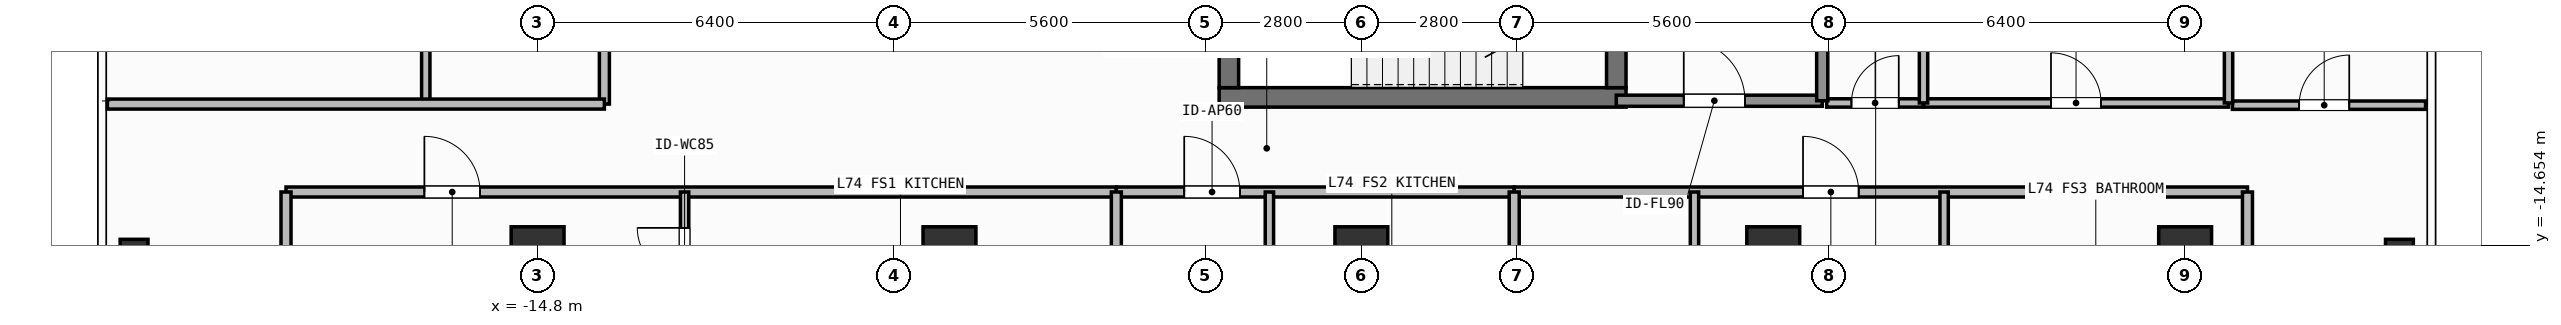
"""IFC4 building model, lengths in metres.
Left out: names, types, materials, properties, quantities, classifications, styles, units other than length and angle.
Written with IfcOpenShell. Run it as: python <this file> out.ifc"""

import sys

from ifc_helpers import new_model, si_unit, direction, frame, frame_2d, origin, origin_2d, place, context, subcontext, project, spatial, rectangle, hollow_rectangle, extrude, element, fill, save


model = new_model("IFC4")
c1 = context("Model", 3, precision=1e-05, world=origin(), true_north=direction((0.0, 1.0)))
c2 = subcontext(c1, "Body", "Model", "MODEL_VIEW")
j1 = project(units=[si_unit("LENGTHUNIT", "METRE"), si_unit("PLANEANGLEUNIT", "RADIAN")], contexts=[c1])
p1 = place(None, origin())
s1 = spatial("IfcSite", under=j1, at=p1, CompositionType="ELEMENT")
p2 = place(p1, origin())
s2 = spatial("IfcBuilding", under=s1, at=p2, CompositionType="ELEMENT")
p3 = place(p2, frame((0.0, 0.0, 301.5)))
s3 = spatial("IfcBuildingStorey", under=s2, at=p3, CompositionType="ELEMENT", Elevation=301.5)
p4 = place(p3, frame((-2.555, -12.0, 0.0), z_axis=(0.0, 0.0, 1.0), x_axis=(1.0, 0.0, 0.0)))
e1 = element("IfcWall", 1, at=p4, inside=s3, PredefinedType="SHEAR", context=c2, shape_type="SweptSolid", body=[
    extrude(rectangle(XDim=7.31, YDim=0.35, at=frame_2d((3.655, 0.0))), origin(), (0.0, 0.0, 1.0), 3.9),
])
p5 = place(p3, frame((-2.38, -11.825, 0.0), z_axis=(0.0, 0.0, 1.0), x_axis=(0.0, 1.0, 0.0)))
e2 = element("IfcWall", 2, at=p5, inside=s3, PredefinedType="SHEAR", context=c2, shape_type="SweptSolid", body=[
    extrude(rectangle(XDim=2.925, YDim=0.35, at=frame_2d((1.462, 0.0))), origin(), (0.0, 0.0, 1.0), 3.9),
])
p6 = place(p3, frame((4.58, -8.9, 0.0), z_axis=(0.0, 0.0, 1.0), x_axis=(0.0, -1.0, 0.0)))
e3 = element("IfcWall", 3, at=p6, inside=s3, PredefinedType="SHEAR", context=c2, shape_type="SweptSolid", body=[
    extrude(rectangle(XDim=2.925, YDim=0.35, at=frame_2d((1.462, 0.0))), origin(), (0.0, 0.0, 1.0), 3.9),
])
p7 = place(p6, frame((0.913, 0.0, 0.0)))
e4 = element("IfcOpeningElement", 4, at=p7, cuts=e3, PredefinedType="OPENING", context=c2, shape_type="SweptSolid", body=[
    extrude(rectangle(XDim=1.1, YDim=2.15, at=frame_2d((0.55, 1.075))), frame((0.0, 0.185, 0.0), z_axis=(0.0, -1.0, 0.0), x_axis=(1.0, 0.0, 0.0)), (0.0, 0.0, 1.0), 0.37),
])
for number, where, z_axis, x_axis in (
    (5, (-14.8, -14.8, 0.0), (0.0, 0.0, 1.0), (1.0, 0.0, 0.0)),
    (6, (-7.4, -14.8, 0.0), (0.0, 0.0, 1.0), (1.0, 0.0, 0.0)),
    (7, (0.0, -14.8, 0.0), (0.0, 0.0, 1.0), (1.0, 0.0, 0.0)),
    (8, (7.4, -14.8, 0.0), (0.0, 0.0, 1.0), (1.0, 0.0, 0.0)),
    (9, (14.8, -14.8, 0.0), (0.0, 0.0, 1.0), (1.0, 0.0, 0.0)),
):
    element("IfcColumn", number, at=place(p3, frame(where, z_axis=z_axis, x_axis=x_axis)), inside=s3, PredefinedType="COLUMN", context=c2, shape_type="SweptSolid", body=[
        extrude(rectangle(XDim=0.95, YDim=0.95, at=origin_2d()), origin(), (0.0, 0.0, 1.0), 3.9),
    ])
for number, where, z_axis, x_axis in (
    (10, (-22.05, -14.8, 0.0), (0.0, 0.0, 1.0), (1.0, 0.0, 0.0)),
    (11, (18.65, -14.8, 0.0), (0.0, 0.0, 1.0), (1.0, 0.0, 0.0)),
):
    element("IfcColumn", number, at=place(p3, frame(where, z_axis=z_axis, x_axis=x_axis)), inside=s3, PredefinedType="COLUMN", context=c2, shape_type="SweptSolid", body=[
        extrude(hollow_rectangle(XDim=0.5, YDim=0.5, WallThickness=0.025, at=origin_2d()), origin(), (0.0, 0.0, 1.0), 3.9),
    ])
p8 = place(p3, frame((4.58, -12.06, 0.0), z_axis=(0.0, 0.0, 1.0), x_axis=(1.0, 0.0, 0.0)))
e12 = element("IfcWall", 12, at=p8, inside=s3, PredefinedType="SOLIDWALL", context=c2, shape_type="SweptSolid", body=[
    extrude(rectangle(XDim=3.7, YDim=0.2, at=frame_2d((1.85, 0.0))), origin(), (0.0, 0.0, 1.0), 3.68),
])
p9 = place(p8, frame((1.212, 0.0, 0.0)))
e13 = element("IfcOpeningElement", 13, at=p9, cuts=e12, PredefinedType="OPENING", context=c2, shape_type="SweptSolid", body=[
    extrude(rectangle(XDim=1.1, YDim=2.15, at=frame_2d((0.55, 1.075))), frame((0.0, 0.11, 0.0), z_axis=(0.0, -1.0, 0.0), x_axis=(1.0, 0.0, 0.0)), (0.0, 0.0, 1.0), 0.22),
])
p10 = place(p3, frame((8.36, -12.1, 0.0), z_axis=(0.0, 0.0, 1.0), x_axis=(1.0, 0.0, 0.0)))
e14 = element("IfcWall", 14, at=p10, inside=s3, PredefinedType="PARTITIONING", context=c2, shape_type="SweptSolid", body=[
    extrude(rectangle(XDim=1.74, YDim=0.15, at=frame_2d((0.87, 0.0))), origin(), (0.0, 0.0, 1.0), 3.68),
])
p11 = place(p10, frame((0.445, 0.0, 0.0)))
e15 = element("IfcOpeningElement", 15, at=p11, cuts=e14, PredefinedType="OPENING", context=c2, shape_type="SweptSolid", body=[
    extrude(rectangle(XDim=0.85, YDim=2.1, at=frame_2d((0.425, 1.05))), frame((0.0, 0.085, 0.0), z_axis=(0.0, -1.0, 0.0), x_axis=(1.0, 0.0, 0.0)), (0.0, 0.0, 1.0), 0.17),
])
p12 = place(p3, frame((10.1, -12.1, 0.0), z_axis=(0.0, 0.0, 1.0), x_axis=(1.0, 0.0, 0.0)))
e16 = element("IfcWall", 16, at=p12, inside=s3, PredefinedType="PARTITIONING", context=c2, shape_type="SweptSolid", body=[
    extrude(rectangle(XDim=5.48, YDim=0.15, at=frame_2d((2.74, 0.0))), origin(), (0.0, 0.0, 1.0), 3.68),
])
p13 = place(p12, frame((2.29, 0.0, 0.0)))
e17 = element("IfcOpeningElement", 17, at=p13, cuts=e16, PredefinedType="OPENING", context=c2, shape_type="SweptSolid", body=[
    extrude(rectangle(XDim=0.9, YDim=2.1, at=frame_2d((0.45, 1.05))), frame((0.0, 0.085, 0.0), z_axis=(0.0, -1.0, 0.0), x_axis=(1.0, 0.0, 0.0)), (0.0, 0.0, 1.0), 0.17),
])
p14 = place(p3, frame((-19.32, -13.7, 0.0), z_axis=(0.0, 0.0, 1.0), x_axis=(1.0, 0.0, 0.0)))
e18 = element("IfcWall", 18, at=p14, inside=s3, PredefinedType="PARTITIONING", context=c2, shape_type="SweptSolid", body=[
    extrude(rectangle(XDim=14.918, YDim=0.18, at=frame_2d((7.459, 0.0))), origin(), (0.0, 0.0, 1.0), 3.68),
])
p15 = place(p14, frame((2.486, 0.0, 0.0)))
e19 = element("IfcOpeningElement", 19, at=p15, cuts=e18, PredefinedType="OPENING", context=c2, shape_type="SweptSolid", body=[
    extrude(rectangle(XDim=1.0, YDim=2.2, at=frame_2d((0.5, 1.1))), frame((0.0, 0.1, 0.0), z_axis=(0.0, -1.0, 0.0), x_axis=(1.0, 0.0, 0.0)), (0.0, 0.0, 1.0), 0.2),
])
p16 = place(p3, frame((-12.159, -15.839, 0.0), z_axis=(0.0, 0.0, 1.0), x_axis=(0.0, 1.0, 0.0)))
e20 = element("IfcWall", 20, at=p16, inside=s3, PredefinedType="PARTITIONING", context=c2, shape_type="SweptSolid", body=[
    extrude(rectangle(XDim=2.139, YDim=0.15, at=frame_2d((1.07, 0.0))), origin(), (0.0, 0.0, 1.0), 3.68),
])
p17 = place(p16, frame((0.645, 0.0, 0.0)))
e21 = element("IfcOpeningElement", 21, at=p17, cuts=e20, PredefinedType="OPENING", context=c2, shape_type="SweptSolid", body=[
    extrude(rectangle(XDim=0.85, YDim=2.1, at=frame_2d((0.425, 1.05))), frame((0.0, 0.085, 0.0), z_axis=(0.0, -1.0, 0.0), x_axis=(1.0, 0.0, 0.0)), (0.0, 0.0, 1.0), 0.17),
])
p18 = place(p3, frame((-4.402, -13.7, 0.0), z_axis=(0.0, 0.0, 1.0), x_axis=(1.0, 0.0, 0.0)))
e22 = element("IfcWall", 22, at=p18, inside=s3, PredefinedType="PARTITIONING", context=c2, shape_type="SweptSolid", body=[
    extrude(rectangle(XDim=7.148, YDim=0.18, at=frame_2d((3.574, 0.0))), origin(), (0.0, 0.0, 1.0), 3.68),
])
p19 = place(p18, frame((1.219, 0.0, 0.0)))
e23 = element("IfcOpeningElement", 23, at=p19, cuts=e22, PredefinedType="OPENING", context=c2, shape_type="SweptSolid", body=[
    extrude(rectangle(XDim=1.0, YDim=2.2, at=frame_2d((0.5, 1.1))), frame((0.0, 0.1, 0.0), z_axis=(0.0, -1.0, 0.0), x_axis=(1.0, 0.0, 0.0)), (0.0, 0.0, 1.0), 0.2),
])
p20 = place(p3, frame((-1.652, -15.803, 0.0), z_axis=(0.0, 0.0, 1.0), x_axis=(0.0, 1.0, 0.0)))
e24 = element("IfcWall", 24, at=p20, inside=s3, PredefinedType="PARTITIONING", context=c2, shape_type="SweptSolid", body=[
    extrude(rectangle(XDim=2.103, YDim=0.15, at=frame_2d((1.052, 0.0))), origin(), (0.0, 0.0, 1.0), 3.68),
])
p21 = place(p3, frame((2.746, -13.7, 0.0), z_axis=(0.0, 0.0, 1.0), x_axis=(1.0, 0.0, 0.0)))
e25 = element("IfcWall", 25, at=p21, inside=s3, PredefinedType="PARTITIONING", context=c2, shape_type="SweptSolid", body=[
    extrude(rectangle(XDim=13.174, YDim=0.18, at=frame_2d((6.587, 0.0))), origin(), (0.0, 0.0, 1.0), 3.68),
])
p22 = place(p21, frame((5.189, 0.0, 0.0)))
e26 = element("IfcOpeningElement", 26, at=p22, cuts=e25, PredefinedType="OPENING", context=c2, shape_type="SweptSolid", body=[
    extrude(rectangle(XDim=1.0, YDim=2.2, at=frame_2d((0.5, 1.1))), frame((0.0, 0.1, 0.0), z_axis=(0.0, -1.0, 0.0), x_axis=(1.0, 0.0, 0.0)), (0.0, 0.0, 1.0), 0.2),
])
p23 = place(p3, frame((5.985, -17.219, 0.0), z_axis=(0.0, 0.0, 1.0), x_axis=(0.0, 1.0, 0.0)))
e27 = element("IfcWall", 27, at=p23, inside=s3, PredefinedType="PARTITIONING", context=c2, shape_type="SweptSolid", body=[
    extrude(rectangle(XDim=3.519, YDim=0.15, at=frame_2d((1.76, 0.0))), origin(), (0.0, 0.0, 1.0), 3.68),
])
p24 = place(p23, frame((0.999, 0.0, 0.0)))
e28 = element("IfcOpeningElement", 28, at=p24, cuts=e27, PredefinedType="OPENING", context=c2, shape_type="SweptSolid", body=[
    extrude(rectangle(XDim=0.85, YDim=2.1, at=frame_2d((0.425, 1.05))), frame((0.0, 0.085, 0.0), z_axis=(0.0, -1.0, 0.0), x_axis=(1.0, 0.0, 0.0)), (0.0, 0.0, 1.0), 0.17),
])
p25 = place(p3, frame((10.47, -17.219, 0.0), z_axis=(0.0, 0.0, 1.0), x_axis=(0.0, 1.0, 0.0)))
e29 = element("IfcWall", 29, at=p25, inside=s3, PredefinedType="PARTITIONING", context=c2, shape_type="SweptSolid", body=[
    extrude(rectangle(XDim=3.519, YDim=0.15, at=frame_2d((1.76, 0.0))), origin(), (0.0, 0.0, 1.0), 3.68),
])
p26 = place(p25, frame((1.334, 0.0, 0.0)))
e30 = element("IfcOpeningElement", 30, at=p26, cuts=e29, PredefinedType="OPENING", context=c2, shape_type="SweptSolid", body=[
    extrude(rectangle(XDim=0.85, YDim=2.1, at=frame_2d((0.425, 1.05))), frame((0.0, 0.085, 0.0), z_axis=(0.0, -1.0, 0.0), x_axis=(1.0, 0.0, 0.0)), (0.0, 0.0, 1.0), 0.17),
])
p27 = place(p3, frame((-13.6, -12.12, 0.0), z_axis=(0.0, 0.0, 1.0), x_axis=(0.0, 1.0, 0.0)))
e31 = element("IfcWall", 31, at=p27, inside=s3, PredefinedType="PARTITIONING", context=c2, shape_type="SweptSolid", body=[
    extrude(rectangle(XDim=24.24, YDim=0.18, at=frame_2d((12.12, 0.0))), origin(), (0.0, 0.0, 1.0), 3.68),
])
p28 = place(p27, frame((9.829, 0.0, 0.0)))
e32 = element("IfcOpeningElement", 32, at=p28, cuts=e31, PredefinedType="OPENING", context=c2, shape_type="SweptSolid", body=[
    extrude(rectangle(XDim=1.0, YDim=2.2, at=frame_2d((0.5, 1.1))), frame((0.0, 0.1, 0.0), z_axis=(0.0, -1.0, 0.0), x_axis=(1.0, 0.0, 0.0)), (0.0, 0.0, 1.0), 0.2),
])
p29 = place(p3, frame((15.65, -12.14, 0.0), z_axis=(0.0, 0.0, 1.0), x_axis=(1.0, 0.0, 0.0)))
e33 = element("IfcWall", 33, at=p29, inside=s3, PredefinedType="PARTITIONING", context=c2, shape_type="SweptSolid", body=[
    extrude(rectangle(XDim=3.47, YDim=0.15, at=frame_2d((1.735, 0.0))), origin(), (0.0, 0.0, 1.0), 3.68),
])
p30 = place(p29, frame((1.198, 0.0, 0.0)))
e34 = element("IfcOpeningElement", 34, at=p30, cuts=e33, PredefinedType="OPENING", context=c2, shape_type="SweptSolid", body=[
    extrude(rectangle(XDim=0.9, YDim=2.1, at=frame_2d((0.45, 1.05))), frame((0.0, 0.085, 0.0), z_axis=(0.0, -1.0, 0.0), x_axis=(1.0, 0.0, 0.0)), (0.0, 0.0, 1.0), 0.17),
])
p31 = place(p3, frame((8.28, -12.06, 0.0), z_axis=(0.0, 0.0, 1.0), x_axis=(0.0, 1.0, 0.0)))
e35 = element("IfcWall", 35, at=p31, inside=s3, PredefinedType="SOLIDWALL", context=c2, shape_type="SweptSolid", body=[
    extrude(rectangle(XDim=3.335, YDim=0.2, at=frame_2d((1.667, 0.0))), origin(), (0.0, 0.0, 1.0), 3.68),
])
p32 = place(p3, frame((10.1, -12.1, 0.0), z_axis=(0.0, 0.0, 1.0), x_axis=(0.0, 1.0, 0.0)))
e36 = element("IfcWall", 36, at=p32, inside=s3, PredefinedType="PARTITIONING", context=c2, shape_type="SweptSolid", body=[
    extrude(rectangle(XDim=2.35, YDim=0.15, at=frame_2d((1.175, 0.0))), origin(), (0.0, 0.0, 1.0), 3.68),
])
p33 = place(p3, frame((15.58, -12.1, 0.0), z_axis=(0.0, 0.0, 1.0), x_axis=(0.0, 1.0, 0.0)))
e37 = element("IfcWall", 37, at=p33, inside=s3, PredefinedType="PARTITIONING", context=c2, shape_type="SweptSolid", body=[
    extrude(rectangle(XDim=6.25, YDim=0.15, at=frame_2d((3.125, 0.0))), origin(), (0.0, 0.0, 1.0), 3.68),
])
for number, where, z_axis, x_axis in (
    (38, (-19.32, -19.51, 0.0), (0.0, 0.0, 1.0), (0.0, 1.0, 0.0)),
    (39, (15.92, -19.51, 0.0), (0.0, 0.0, 1.0), (0.0, 1.0, 0.0)),
):
    element("IfcWall", number, at=place(p3, frame(where, z_axis=z_axis, x_axis=x_axis)), inside=s3, PredefinedType="PARTITIONING", context=c2, shape_type="SweptSolid", body=[
        extrude(rectangle(XDim=5.81, YDim=0.18, at=frame_2d((2.905, 0.0))), origin(), (0.0, 0.0, 1.0), 3.68),
    ])
for number, where, z_axis, x_axis in (
    (40, (-4.402, -20.63, 0.0), (0.0, 0.0, 1.0), (0.0, 1.0, 0.0)),
    (41, (2.746, -20.63, 0.0), (0.0, 0.0, 1.0), (0.0, 1.0, 0.0)),
):
    element("IfcWall", number, at=place(p3, frame(where, z_axis=z_axis, x_axis=x_axis)), inside=s3, PredefinedType="PARTITIONING", context=c2, shape_type="SweptSolid", body=[
        extrude(rectangle(XDim=6.93, YDim=0.18, at=frame_2d((3.465, 0.0))), origin(), (0.0, 0.0, 1.0), 3.68),
    ])
p34 = place(p3, frame((-16.809, -12.12, 0.0), z_axis=(0.0, 0.0, 1.0), x_axis=(0.0, 1.0, 0.0)))
e42 = element("IfcWall", 42, at=p34, inside=s3, PredefinedType="PARTITIONING", context=c2, shape_type="SweptSolid", body=[
    extrude(rectangle(XDim=2.8, YDim=0.15, at=frame_2d((1.4, 0.0))), origin(), (0.0, 0.0, 1.0), 3.68),
])
p35 = place(p3, frame((-22.53, -12.12, 0.0), z_axis=(0.0, 0.0, 1.0), x_axis=(1.0, 0.0, 0.0)))
e43 = element("IfcWall", 43, at=p35, inside=s3, PredefinedType="PARTITIONING", context=c2, shape_type="SweptSolid", body=[
    extrude(rectangle(XDim=8.93, YDim=0.18, at=frame_2d((4.465, 0.0))), origin(), (0.0, 0.0, 1.0), 3.68),
])
p36 = place(p9, origin())
e44 = element("IfcDoor", 44, at=p36, inside=s3, OperationType="SINGLE_SWING_LEFT", PredefinedType="DOOR", context=c2, shape_type="SweptSolid", body=[
    extrude(rectangle(XDim=1.1, YDim=2.15, at=frame_2d((0.55, 1.075))), frame((0.0, 0.025, 0.0), z_axis=(0.0, -1.0, 0.0), x_axis=(1.0, 0.0, 0.0)), (0.0, 0.0, 1.0), 0.05),
])
fill(e13, e44)
p37 = place(p11, origin())
e45 = element("IfcDoor", 45, at=p37, inside=s3, OperationType="SINGLE_SWING_RIGHT", PredefinedType="DOOR", context=c2, shape_type="SweptSolid", body=[
    extrude(rectangle(XDim=0.85, YDim=2.1, at=frame_2d((0.425, 1.05))), frame((0.0, 0.025, 0.0), z_axis=(0.0, -1.0, 0.0), x_axis=(1.0, 0.0, 0.0)), (0.0, 0.0, 1.0), 0.05),
])
fill(e15, e45)
p38 = place(p13, origin())
e46 = element("IfcDoor", 46, at=p38, inside=s3, OperationType="SINGLE_SWING_LEFT", PredefinedType="DOOR", context=c2, shape_type="SweptSolid", body=[
    extrude(rectangle(XDim=0.9, YDim=2.1, at=frame_2d((0.45, 1.05))), frame((0.0, 0.025, 0.0), z_axis=(0.0, -1.0, 0.0), x_axis=(1.0, 0.0, 0.0)), (0.0, 0.0, 1.0), 0.05),
])
fill(e17, e46)
p39 = place(p15, origin())
e47 = element("IfcDoor", 47, at=p39, inside=s3, OperationType="SINGLE_SWING_LEFT", PredefinedType="DOOR", context=c2, shape_type="SweptSolid", body=[
    extrude(rectangle(XDim=1.0, YDim=2.2, at=frame_2d((0.5, 1.1))), frame((0.0, 0.025, 0.0), z_axis=(0.0, -1.0, 0.0), x_axis=(1.0, 0.0, 0.0)), (0.0, 0.0, 1.0), 0.05),
])
fill(e19, e47)
p40 = place(p17, origin())
e48 = element("IfcDoor", 48, at=p40, inside=s3, OperationType="SINGLE_SWING_RIGHT", PredefinedType="DOOR", context=c2, shape_type="SweptSolid", body=[
    extrude(rectangle(XDim=0.85, YDim=2.1, at=frame_2d((0.425, 1.05))), frame((0.0, 0.025, 0.0), z_axis=(0.0, -1.0, 0.0), x_axis=(1.0, 0.0, 0.0)), (0.0, 0.0, 1.0), 0.05),
])
fill(e21, e48)
p41 = place(p19, origin())
e49 = element("IfcDoor", 49, at=p41, inside=s3, OperationType="SINGLE_SWING_LEFT", PredefinedType="DOOR", context=c2, shape_type="SweptSolid", body=[
    extrude(rectangle(XDim=1.0, YDim=2.2, at=frame_2d((0.5, 1.1))), frame((0.0, 0.025, 0.0), z_axis=(0.0, -1.0, 0.0), x_axis=(1.0, 0.0, 0.0)), (0.0, 0.0, 1.0), 0.05),
])
fill(e23, e49)
p42 = place(p22, origin())
e50 = element("IfcDoor", 50, at=p42, inside=s3, OperationType="SINGLE_SWING_LEFT", PredefinedType="DOOR", context=c2, shape_type="SweptSolid", body=[
    extrude(rectangle(XDim=1.0, YDim=2.2, at=frame_2d((0.5, 1.1))), frame((0.0, 0.025, 0.0), z_axis=(0.0, -1.0, 0.0), x_axis=(1.0, 0.0, 0.0)), (0.0, 0.0, 1.0), 0.05),
])
fill(e26, e50)
p43 = place(p30, origin())
e51 = element("IfcDoor", 51, at=p43, inside=s3, OperationType="SINGLE_SWING_RIGHT", PredefinedType="DOOR", context=c2, shape_type="SweptSolid", body=[
    extrude(rectangle(XDim=0.9, YDim=2.1, at=frame_2d((0.45, 1.05))), frame((0.0, 0.025, 0.0), z_axis=(0.0, -1.0, 0.0), x_axis=(1.0, 0.0, 0.0)), (0.0, 0.0, 1.0), 0.05),
])
fill(e34, e51)
save(model, sys.argv[1])
